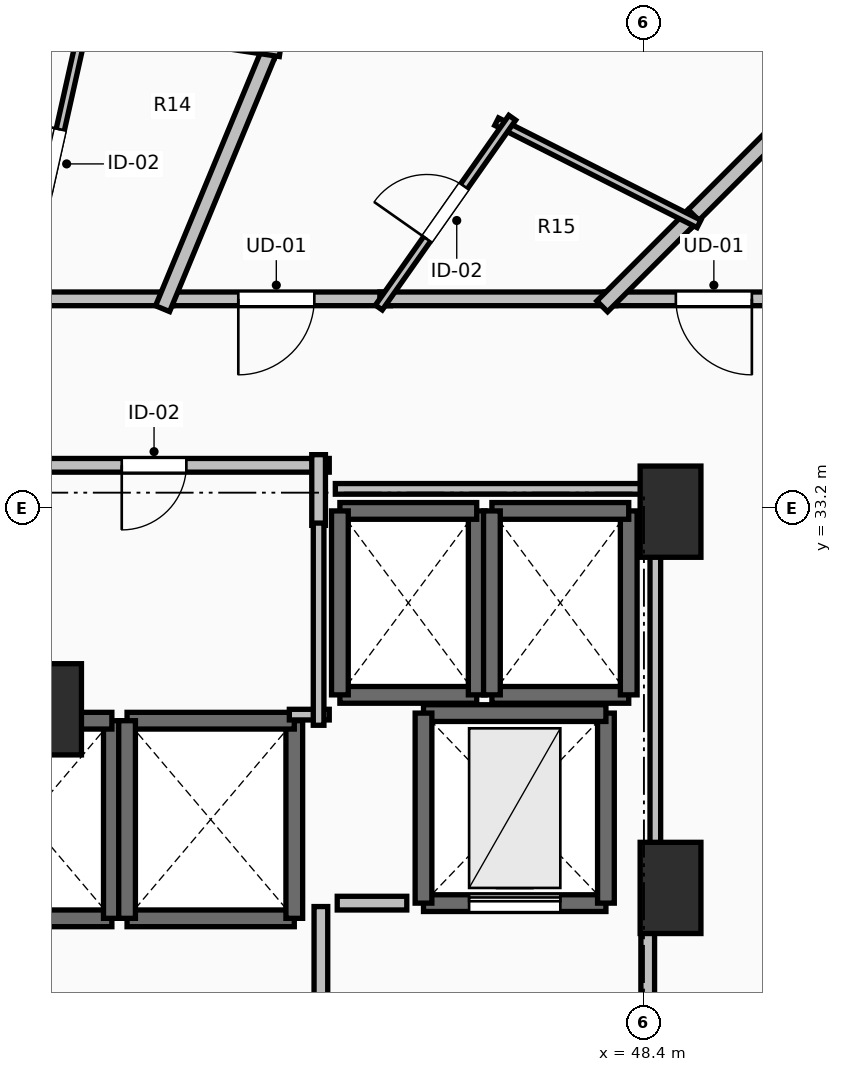
"""IFC4 building model, lengths in metres.
Left out: names, types, materials, properties, quantities, classifications, styles, units other than length and angle.
Written with IfcOpenShell. Run it as: python <this file> out.ifc"""

import sys

from ifc_helpers import new_model, si_unit, direction, frame, frame_2d, origin, origin_2d, place, context, subcontext, project, spatial, rectangle, extrude, element, fill, save


model = new_model("IFC4")
c1 = context("Model", 3, precision=1e-05, world=origin(), true_north=direction((0.0, 1.0)))
c2 = subcontext(c1, "Body", "Model", "MODEL_VIEW")
j1 = project(units=[si_unit("LENGTHUNIT", "METRE"), si_unit("PLANEANGLEUNIT", "RADIAN")], contexts=[c1])
p1 = place(None, origin())
s1 = spatial("IfcSite", under=j1, at=p1, CompositionType="ELEMENT")
p2 = place(p1, origin())
s2 = spatial("IfcBuilding", under=s1, at=p2, CompositionType="ELEMENT")
p3 = place(p2, frame((0.0, 0.0, 106.8)))
s3 = spatial("IfcBuildingStorey", under=s2, at=p3, CompositionType="ELEMENT", Elevation=106.8)
for number, where, z_axis, x_axis in (
    (1, (48.75, 33.15, 0.0), (0.0, 0.0, 1.0), (1.0, 0.0, 0.0)),
    (2, (48.75, 28.2, 0.0), (0.0, 0.0, 1.0), (1.0, 0.0, 0.0)),
    (3, (40.6, 30.55, 0.0), (0.0, 0.0, 1.0), (1.0, 0.0, 0.0)),
):
    element("IfcColumn", number, at=place(p3, frame(where, z_axis=z_axis, x_axis=x_axis)), inside=s3, PredefinedType="PILASTER", context=c2, shape_type="SweptSolid", body=[
        extrude(rectangle(XDim=0.8, YDim=1.2, at=origin_2d()), origin(), (0.0, 0.0, 1.0), 3.5),
    ])
p4 = place(p3, frame((39.2, 27.8, 0.0), z_axis=(0.0, 0.0, 1.0), x_axis=(1.0, 0.0, 0.0)))
e4 = element("IfcWall", 4, at=p4, inside=s3, PredefinedType="SOLIDWALL", context=c2, shape_type="SweptSolid", body=[
    extrude(rectangle(XDim=2.2, YDim=0.22, at=frame_2d((1.1, 0.0))), origin(), (0.0, 0.0, 1.0), 3.24),
])
p5 = place(p3, frame((41.4, 27.8, 0.0), z_axis=(0.0, 0.0, 1.0), x_axis=(0.0, 1.0, 0.0)))
e5 = element("IfcWall", 5, at=p5, inside=s3, PredefinedType="SOLIDWALL", context=c2, shape_type="SweptSolid", body=[
    extrude(rectangle(XDim=2.6, YDim=0.22, at=frame_2d((1.3, 0.0))), origin(), (0.0, 0.0, 1.0), 3.24),
])
for number, where, z_axis, x_axis in (
    (6, (41.4, 30.4, 0.0), (0.0, 0.0, 1.0), (-1.0, 0.0, 0.0)),
    (7, (41.6, 27.8, 0.0), (0.0, 0.0, 1.0), (1.0, 0.0, 0.0)),
):
    element("IfcWall", number, at=place(p3, frame(where, z_axis=z_axis, x_axis=x_axis)), inside=s3, PredefinedType="SOLIDWALL", context=c2, shape_type="SweptSolid", body=[
        extrude(rectangle(XDim=2.2, YDim=0.22, at=frame_2d((1.1, 0.0))), origin(), (0.0, 0.0, 1.0), 3.24),
    ])
p6 = place(p3, frame((43.8, 27.8, 0.0), z_axis=(0.0, 0.0, 1.0), x_axis=(0.0, 1.0, 0.0)))
e8 = element("IfcWall", 8, at=p6, inside=s3, PredefinedType="SOLIDWALL", context=c2, shape_type="SweptSolid", body=[
    extrude(rectangle(XDim=2.6, YDim=0.22, at=frame_2d((1.3, 0.0))), origin(), (0.0, 0.0, 1.0), 3.24),
])
p7 = place(p3, frame((43.8, 30.4, 0.0), z_axis=(0.0, 0.0, 1.0), x_axis=(-1.0, 0.0, 0.0)))
e9 = element("IfcWall", 9, at=p7, inside=s3, PredefinedType="SOLIDWALL", context=c2, shape_type="SweptSolid", body=[
    extrude(rectangle(XDim=2.2, YDim=0.22, at=frame_2d((1.1, 0.0))), origin(), (0.0, 0.0, 1.0), 3.24),
])
p8 = place(p3, frame((41.6, 30.4, 0.0), z_axis=(0.0, 0.0, 1.0), x_axis=(0.0, -1.0, 0.0)))
e10 = element("IfcWall", 10, at=p8, inside=s3, PredefinedType="SOLIDWALL", context=c2, shape_type="SweptSolid", body=[
    extrude(rectangle(XDim=2.6, YDim=0.22, at=frame_2d((1.3, 0.0))), origin(), (0.0, 0.0, 1.0), 3.24),
])
p9 = place(p3, frame((44.4, 30.74, 0.0), z_axis=(0.0, 0.0, 1.0), x_axis=(1.0, 0.0, 0.0)))
e11 = element("IfcWall", 11, at=p9, inside=s3, PredefinedType="SOLIDWALL", context=c2, shape_type="SweptSolid", body=[
    extrude(rectangle(XDim=1.8, YDim=0.22, at=frame_2d((0.9, 0.0))), origin(), (0.0, 0.0, 1.0), 3.24),
])
p10 = place(p3, frame((46.2, 30.74, 0.0), z_axis=(0.0, 0.0, 1.0), x_axis=(0.0, 1.0, 0.0)))
e12 = element("IfcWall", 12, at=p10, inside=s3, PredefinedType="SOLIDWALL", context=c2, shape_type="SweptSolid", body=[
    extrude(rectangle(XDim=2.42, YDim=0.22, at=frame_2d((1.21, 0.0))), origin(), (0.0, 0.0, 1.0), 3.24),
])
p11 = place(p3, frame((46.2, 33.16, 0.0), z_axis=(0.0, 0.0, 1.0), x_axis=(-1.0, 0.0, 0.0)))
e13 = element("IfcWall", 13, at=p11, inside=s3, PredefinedType="SOLIDWALL", context=c2, shape_type="SweptSolid", body=[
    extrude(rectangle(XDim=1.8, YDim=0.22, at=frame_2d((0.9, 0.0))), origin(), (0.0, 0.0, 1.0), 3.24),
])
p12 = place(p3, frame((44.4, 33.16, 0.0), z_axis=(0.0, 0.0, 1.0), x_axis=(0.0, -1.0, 0.0)))
e14 = element("IfcWall", 14, at=p12, inside=s3, PredefinedType="SOLIDWALL", context=c2, shape_type="SweptSolid", body=[
    extrude(rectangle(XDim=2.42, YDim=0.22, at=frame_2d((1.21, 0.0))), origin(), (0.0, 0.0, 1.0), 3.24),
])
p13 = place(p3, frame((46.4, 30.74, 0.0), z_axis=(0.0, 0.0, 1.0), x_axis=(1.0, 0.0, 0.0)))
e15 = element("IfcWall", 15, at=p13, inside=s3, PredefinedType="SOLIDWALL", context=c2, shape_type="SweptSolid", body=[
    extrude(rectangle(XDim=1.8, YDim=0.22, at=frame_2d((0.9, 0.0))), origin(), (0.0, 0.0, 1.0), 3.24),
])
p14 = place(p3, frame((48.2, 30.74, 0.0), z_axis=(0.0, 0.0, 1.0), x_axis=(0.0, 1.0, 0.0)))
e16 = element("IfcWall", 16, at=p14, inside=s3, PredefinedType="SOLIDWALL", context=c2, shape_type="SweptSolid", body=[
    extrude(rectangle(XDim=2.42, YDim=0.22, at=frame_2d((1.21, 0.0))), origin(), (0.0, 0.0, 1.0), 3.24),
])
p15 = place(p3, frame((48.2, 33.16, 0.0), z_axis=(0.0, 0.0, 1.0), x_axis=(-1.0, 0.0, 0.0)))
e17 = element("IfcWall", 17, at=p15, inside=s3, PredefinedType="SOLIDWALL", context=c2, shape_type="SweptSolid", body=[
    extrude(rectangle(XDim=1.8, YDim=0.22, at=frame_2d((0.9, 0.0))), origin(), (0.0, 0.0, 1.0), 3.24),
])
p16 = place(p3, frame((46.4, 33.16, 0.0), z_axis=(0.0, 0.0, 1.0), x_axis=(0.0, -1.0, 0.0)))
e18 = element("IfcWall", 18, at=p16, inside=s3, PredefinedType="SOLIDWALL", context=c2, shape_type="SweptSolid", body=[
    extrude(rectangle(XDim=2.42, YDim=0.22, at=frame_2d((1.21, 0.0))), origin(), (0.0, 0.0, 1.0), 3.24),
])
p17 = place(p3, frame((45.5, 28.0, 0.0), z_axis=(0.0, 0.0, 1.0), x_axis=(1.0, 0.0, 0.0)))
e19 = element("IfcWall", 19, at=p17, inside=s3, PredefinedType="SHEAR", context=c2, shape_type="SweptSolid", body=[
    extrude(rectangle(XDim=2.4, YDim=0.22, at=frame_2d((1.2, 0.0))), origin(), (0.0, 0.0, 1.0), 3.24),
])
p18 = place(p17, frame((0.6, 0.0, 0.0)))
e20 = element("IfcOpeningElement", 20, at=p18, cuts=e19, PredefinedType="OPENING", context=c2, shape_type="SweptSolid", body=[
    extrude(rectangle(XDim=1.2, YDim=2.2, at=frame_2d((0.6, 1.1))), frame((0.0, 0.125, 0.0), z_axis=(0.0, -1.0, 0.0), x_axis=(1.0, 0.0, 0.0)), (0.0, 0.0, 1.0), 0.25),
])
p19 = place(p3, frame((47.9, 28.0, 0.0), z_axis=(0.0, 0.0, 1.0), x_axis=(0.0, 1.0, 0.0)))
e21 = element("IfcWall", 21, at=p19, inside=s3, PredefinedType="SHEAR", context=c2, shape_type="SweptSolid", body=[
    extrude(rectangle(XDim=2.5, YDim=0.22, at=frame_2d((1.25, 0.0))), origin(), (0.0, 0.0, 1.0), 3.24),
])
p20 = place(p3, frame((47.9, 30.5, 0.0), z_axis=(0.0, 0.0, 1.0), x_axis=(-1.0, 0.0, 0.0)))
e22 = element("IfcWall", 22, at=p20, inside=s3, PredefinedType="SHEAR", context=c2, shape_type="SweptSolid", body=[
    extrude(rectangle(XDim=2.4, YDim=0.22, at=frame_2d((1.2, 0.0))), origin(), (0.0, 0.0, 1.0), 3.24),
])
p21 = place(p3, frame((45.5, 30.5, 0.0), z_axis=(0.0, 0.0, 1.0), x_axis=(0.0, -1.0, 0.0)))
e23 = element("IfcWall", 23, at=p21, inside=s3, PredefinedType="SHEAR", context=c2, shape_type="SweptSolid", body=[
    extrude(rectangle(XDim=2.5, YDim=0.22, at=frame_2d((1.25, 0.0))), origin(), (0.0, 0.0, 1.0), 3.24),
])
p22 = place(p3, frame((44.15, 27.955, 0.0), z_axis=(0.0, 0.0, 1.0), x_axis=(0.0, -1.0, 0.0)))
e24 = element("IfcWall", 24, at=p22, inside=s3, PredefinedType="PARTITIONING", context=c2, shape_type="SweptSolid", body=[
    extrude(rectangle(XDim=3.91, YDim=0.18, at=frame_2d((1.955, 0.0))), origin(), (0.0, 0.0, 1.0), 3.24),
])
p23 = place(p22, frame((1.355, 0.0, 0.0)))
e25 = element("IfcOpeningElement", 25, at=p23, cuts=e24, PredefinedType="OPENING", context=c2, shape_type="SweptSolid", body=[
    extrude(rectangle(XDim=1.2, YDim=2.15, at=frame_2d((0.6, 1.075))), frame((0.0, 0.105, 0.0), z_axis=(0.0, -1.0, 0.0), x_axis=(1.0, 0.0, 0.0)), (0.0, 0.0, 1.0), 0.21),
])
p24 = place(p3, frame((48.45, 23.95, 0.0), z_axis=(0.0, 0.0, 1.0), x_axis=(0.0, 1.0, 0.0)))
e26 = element("IfcWall", 26, at=p24, inside=s3, PredefinedType="PARTITIONING", context=c2, shape_type="SweptSolid", body=[
    extrude(rectangle(XDim=4.05, YDim=0.18, at=frame_2d((2.025, 0.0))), origin(), (0.0, 0.0, 1.0), 3.24),
])
p25 = place(p24, frame((1.425, 0.0, 0.0)))
e27 = element("IfcOpeningElement", 27, at=p25, cuts=e26, PredefinedType="OPENING", context=c2, shape_type="SweptSolid", body=[
    extrude(rectangle(XDim=1.2, YDim=2.15, at=frame_2d((0.6, 1.075))), frame((0.0, 0.105, 0.0), z_axis=(0.0, -1.0, 0.0), x_axis=(1.0, 0.0, 0.0)), (0.0, 0.0, 1.0), 0.21),
])
p26 = place(p3, frame((44.26, 33.76, 0.0), z_axis=(0.0, 0.0, 1.0), x_axis=(-1.0, 0.0, 0.0)))
e28 = element("IfcWall", 28, at=p26, inside=s3, PredefinedType="PARTITIONING", context=c2, shape_type="SweptSolid", body=[
    extrude(rectangle(XDim=4.61, YDim=0.18, at=frame_2d((2.305, 0.0))), origin(), (0.0, 0.0, 1.0), 3.24),
])
p27 = place(p26, frame((1.88, 0.0, 0.0)))
e29 = element("IfcOpeningElement", 29, at=p27, cuts=e28, PredefinedType="OPENING", context=c2, shape_type="SweptSolid", body=[
    extrude(rectangle(XDim=0.85, YDim=2.1, at=frame_2d((0.425, 1.05))), frame((0.0, 0.105, 0.0), z_axis=(0.0, -1.0, 0.0), x_axis=(1.0, 0.0, 0.0)), (0.0, 0.0, 1.0), 0.21),
])
p28 = place(p3, frame((44.12, 32.97, 0.0), z_axis=(0.0, 0.0, 1.0), x_axis=(0.0, 1.0, 0.0)))
e30 = element("IfcWall", 30, at=p28, inside=s3, PredefinedType="PARTITIONING", context=c2, shape_type="SweptSolid", body=[
    extrude(rectangle(XDim=0.93, YDim=0.18, at=frame_2d((0.465, 0.0))), origin(), (0.0, 0.0, 1.0), 3.24),
])
p29 = place(p3, frame((50.75, 35.95, 0.0), z_axis=(0.0, 0.0, 1.0), x_axis=(-1.0, 0.0, 0.0)))
e31 = element("IfcWall", 31, at=p29, inside=s3, PredefinedType="PARTITIONING", context=c2, shape_type="SweptSolid", body=[
    extrude(rectangle(XDim=2.86, YDim=0.18, at=frame_2d((1.43, 0.0))), origin(), (0.0, 0.0, 1.0), 2.432),
])
p30 = place(p29, frame((0.93, 0.0, 0.0)))
e32 = element("IfcOpeningElement", 32, at=p30, cuts=e31, PredefinedType="OPENING", context=c2, shape_type="SweptSolid", body=[
    extrude(rectangle(XDim=1.0, YDim=2.15, at=frame_2d((0.5, 1.075))), frame((0.0, 0.105, 0.0), z_axis=(0.0, -1.0, 0.0), x_axis=(1.0, 0.0, 0.0)), (0.0, 0.0, 1.0), 0.21),
])
p31 = place(p3, frame((45.066, 35.95, 0.0), z_axis=(0.0, 0.0, 1.0), x_axis=(-1.0, 0.0, 0.0)))
e33 = element("IfcWall", 33, at=p31, inside=s3, PredefinedType="PARTITIONING", context=c2, shape_type="SweptSolid", body=[
    extrude(rectangle(XDim=3.005, YDim=0.18, at=frame_2d((1.502, 0.0))), origin(), (0.0, 0.0, 1.0), 3.24),
])
p32 = place(p31, frame((1.002, 0.0, 0.0)))
e34 = element("IfcOpeningElement", 34, at=p32, cuts=e33, PredefinedType="OPENING", context=c2, shape_type="SweptSolid", body=[
    extrude(rectangle(XDim=1.0, YDim=2.15, at=frame_2d((0.5, 1.075))), frame((0.0, 0.105, 0.0), z_axis=(0.0, -1.0, 0.0), x_axis=(1.0, 0.0, 0.0)), (0.0, 0.0, 1.0), 0.21),
])
p33 = place(p3, frame((48.03, 35.95, 0.0), z_axis=(0.0, 0.0, 1.0), x_axis=(-1.0, 0.0, 0.0)))
e35 = element("IfcWall", 35, at=p33, inside=s3, PredefinedType="PARTITIONING", context=c2, shape_type="SweptSolid", body=[
    extrude(rectangle(XDim=3.104, YDim=0.18, at=frame_2d((1.552, 0.0))), origin(), (0.0, 0.0, 1.0), 2.432),
])
p34 = place(p3, frame((42.201, 35.95, 0.0), z_axis=(0.0, 0.0, 1.0), x_axis=(-1.0, 0.0, 0.0)))
e36 = element("IfcWall", 36, at=p34, inside=s3, PredefinedType="PARTITIONING", context=c2, shape_type="SweptSolid", body=[
    extrude(rectangle(XDim=2.056, YDim=0.18, at=frame_2d((1.028, 0.0))), origin(), (0.0, 0.0, 1.0), 3.24),
])
p35 = place(p3, frame((53.768, 41.768, 0.0), z_axis=(0.0, 0.0, 1.0), x_axis=(-0.707106781187, -0.707106781187, 0.0)))
e37 = element("IfcWall", 37, at=p35, inside=s3, PredefinedType="PARTITIONING", context=c2, shape_type="SweptSolid", body=[
    extrude(rectangle(XDim=6.808, YDim=0.2, at=frame_2d((3.404, 0.0))), origin(), (0.0, 0.0, 1.0), 2.677),
])
p36 = place(p3, frame((49.053, 37.053, 0.0), z_axis=(0.0, 0.0, 1.0), x_axis=(-0.707106781187, -0.707106781187, 0.0)))
e38 = element("IfcWall", 38, at=p36, inside=s3, PredefinedType="PARTITIONING", context=c2, shape_type="SweptSolid", body=[
    extrude(rectangle(XDim=1.7, YDim=0.2, at=frame_2d((0.85, 0.0))), origin(), (0.0, 0.0, 1.0), 2.432),
])
p37 = place(p3, frame((46.462, 38.281, 0.0), z_axis=(0.0, 0.0, 1.0), x_axis=(0.892486842203, -0.451073426944, 0.0)))
e39 = element("IfcWall", 39, at=p37, inside=s3, PredefinedType="PARTITIONING", context=c2, shape_type="SweptSolid", body=[
    extrude(rectangle(XDim=2.982, YDim=0.11, at=frame_2d((1.491, 0.0))), origin(), (0.0, 0.0, 1.0), 2.432),
])
p38 = place(p3, frame((44.913, 35.835, 0.0), z_axis=(0.0, 0.0, 1.0), x_axis=(0.574986040322, 0.818163219312, 0.0)))
e40 = element("IfcWall", 40, at=p38, inside=s3, PredefinedType="PARTITIONING", context=c2, shape_type="SweptSolid", body=[
    extrude(rectangle(XDim=3.052, YDim=0.11, at=frame_2d((1.526, 0.0))), origin(), (0.0, 0.0, 1.0), 2.886),
])
p39 = place(p38, frame((1.101, 0.0, 0.0)))
e41 = element("IfcOpeningElement", 41, at=p39, cuts=e40, PredefinedType="OPENING", context=c2, shape_type="SweptSolid", body=[
    extrude(rectangle(XDim=0.85, YDim=2.1, at=frame_2d((0.425, 1.05))), frame((0.0, 0.07, 0.0), z_axis=(0.0, -1.0, 0.0), x_axis=(1.0, 0.0, 0.0)), (0.0, 0.0, 1.0), 0.14),
])
p40 = place(p3, frame((45.808, 44.851, 0.0), z_axis=(0.0, 0.0, 1.0), x_axis=(-0.382705075352, -0.923870567395, 0.0)))
e42 = element("IfcWall", 42, at=p40, inside=s3, PredefinedType="PARTITIONING", context=c2, shape_type="SweptSolid", body=[
    extrude(rectangle(XDim=6.164, YDim=0.2, at=frame_2d((3.082, 0.0))), origin(), (0.0, 0.0, 1.0), 2.677),
])
p41 = place(p3, frame((43.503, 39.285, 0.0), z_axis=(0.0, 0.0, 1.0), x_axis=(-0.382733183699, -0.923858923265, 0.0)))
e43 = element("IfcWall", 43, at=p41, inside=s3, PredefinedType="PARTITIONING", context=c2, shape_type="SweptSolid", body=[
    extrude(rectangle(XDim=3.75, YDim=0.2, at=frame_2d((1.875, 0.0))), origin(), (0.0, 0.0, 1.0), 2.886),
])
p42 = place(p3, frame((40.194, 35.813, 0.0), z_axis=(0.0, 0.0, 1.0), x_axis=(0.21804880916, 0.975937865248, 0.0)))
e44 = element("IfcWall", 44, at=p42, inside=s3, PredefinedType="PARTITIONING", context=c2, shape_type="SweptSolid", body=[
    extrude(rectangle(XDim=3.998, YDim=0.11, at=frame_2d((1.999, 0.0))), origin(), (0.0, 0.0, 1.0), 2.886),
])
p43 = place(p42, frame((1.574, 0.0, 0.0)))
e45 = element("IfcOpeningElement", 45, at=p43, cuts=e44, PredefinedType="OPENING", context=c2, shape_type="SweptSolid", body=[
    extrude(rectangle(XDim=0.85, YDim=2.1, at=frame_2d((0.425, 1.05))), frame((0.0, 0.07, 0.0), z_axis=(0.0, -1.0, 0.0), x_axis=(1.0, 0.0, 0.0)), (0.0, 0.0, 1.0), 0.14),
])
p44 = place(p3, frame((40.896, 39.6, 0.0), z_axis=(0.0, 0.0, 1.0), x_axis=(0.98891024541, -0.148514398367, 0.0)))
e46 = element("IfcWall", 46, at=p44, inside=s3, PredefinedType="PARTITIONING", context=c2, shape_type="SweptSolid", body=[
    extrude(rectangle(XDim=2.745, YDim=0.11, at=frame_2d((1.373, 0.0))), origin(), (0.0, 0.0, 1.0), 2.972),
])
p45 = place(p3, frame((45.28, 28.0, 0.0), z_axis=(0.0, 0.0, 1.0), x_axis=(-1.0, 0.0, 0.0)))
e47 = element("IfcWall", 47, at=p45, inside=s3, PredefinedType="PARTITIONING", context=c2, shape_type="SweptSolid", body=[
    extrude(rectangle(XDim=0.915, YDim=0.18, at=frame_2d((0.458, 0.0))), origin(), (0.0, 0.0, 1.0), 3.24),
])
p46 = place(p3, frame((43.735, 30.48, 0.0), z_axis=(0.0, 0.0, 1.0), x_axis=(1.0, 0.0, 0.0)))
e48 = element("IfcWall", 48, at=p46, inside=s3, PredefinedType="PARTITIONING", context=c2, shape_type="SweptSolid", body=[
    extrude(rectangle(XDim=0.525, YDim=0.14, at=frame_2d((0.262, 0.0))), origin(), (0.0, 0.0, 1.0), 3.24),
])
p47 = place(p3, frame((44.12, 30.34, 0.0), z_axis=(0.0, 0.0, 1.0), x_axis=(0.0, 1.0, 0.0)))
e49 = element("IfcWall", 49, at=p47, inside=s3, PredefinedType="PARTITIONING", context=c2, shape_type="SweptSolid", body=[
    extrude(rectangle(XDim=2.66, YDim=0.14, at=frame_2d((1.33, 0.0))), origin(), (0.0, 0.0, 1.0), 3.24),
])
p48 = place(p3, frame((44.34, 33.45, 0.0), z_axis=(0.0, 0.0, 1.0), x_axis=(1.0, 0.0, 0.0)))
e50 = element("IfcWall", 50, at=p48, inside=s3, PredefinedType="PARTITIONING", context=c2, shape_type="SweptSolid", body=[
    extrude(rectangle(XDim=4.21, YDim=0.14, at=frame_2d((2.105, 0.0))), origin(), (0.0, 0.0, 1.0), 2.432),
])
p49 = place(p3, frame((48.55, 33.45, 0.0), z_axis=(0.0, 0.0, 1.0), x_axis=(0.0, -1.0, 0.0)))
e51 = element("IfcWall", 51, at=p49, inside=s3, PredefinedType="PARTITIONING", context=c2, shape_type="SweptSolid", body=[
    extrude(rectangle(XDim=5.254, YDim=0.14, at=frame_2d((2.627, 0.0))), origin(), (0.0, 0.0, 1.0), 2.432),
])
p50 = place(p18, origin())
e52 = element("IfcDoor", 52, at=p50, inside=s3, OperationType="SLIDING_TO_LEFT", PredefinedType="DOOR", context=c2, shape_type="SweptSolid", body=[
    extrude(rectangle(XDim=1.2, YDim=2.2, at=frame_2d((0.6, 1.1))), frame((0.0, 0.025, 0.0), z_axis=(0.0, -1.0, 0.0), x_axis=(1.0, 0.0, 0.0)), (0.0, 0.0, 1.0), 0.05),
])
fill(e20, e52)
p51 = place(p27, origin())
e53 = element("IfcDoor", 53, at=p51, inside=s3, OperationType="SINGLE_SWING_RIGHT", PredefinedType="DOOR", context=c2, shape_type="SweptSolid", body=[
    extrude(rectangle(XDim=0.85, YDim=2.1, at=frame_2d((0.425, 1.05))), frame((0.0, 0.025, 0.0), z_axis=(0.0, -1.0, 0.0), x_axis=(1.0, 0.0, 0.0)), (0.0, 0.0, 1.0), 0.05),
])
fill(e29, e53)
p52 = place(p30, origin())
e54 = element("IfcDoor", 54, at=p52, inside=s3, OperationType="SINGLE_SWING_LEFT", PredefinedType="DOOR", context=c2, shape_type="SweptSolid", body=[
    extrude(rectangle(XDim=1.0, YDim=2.15, at=frame_2d((0.5, 1.075))), frame((0.0, 0.025, 0.0), z_axis=(0.0, -1.0, 0.0), x_axis=(1.0, 0.0, 0.0)), (0.0, 0.0, 1.0), 0.05),
])
fill(e32, e54)
p53 = place(p32, origin())
e55 = element("IfcDoor", 55, at=p53, inside=s3, OperationType="SINGLE_SWING_RIGHT", PredefinedType="DOOR", context=c2, shape_type="SweptSolid", body=[
    extrude(rectangle(XDim=1.0, YDim=2.15, at=frame_2d((0.5, 1.075))), frame((0.0, 0.025, 0.0), z_axis=(0.0, -1.0, 0.0), x_axis=(1.0, 0.0, 0.0)), (0.0, 0.0, 1.0), 0.05),
])
fill(e34, e55)
p54 = place(p39, origin())
e56 = element("IfcDoor", 56, at=p54, inside=s3, OperationType="SINGLE_SWING_LEFT", PredefinedType="DOOR", context=c2, shape_type="SweptSolid", body=[
    extrude(rectangle(XDim=0.85, YDim=2.1, at=frame_2d((0.425, 1.05))), frame((0.0, 0.025, 0.0), z_axis=(0.0, -1.0, 0.0), x_axis=(1.0, 0.0, 0.0)), (0.0, 0.0, 1.0), 0.05),
])
fill(e41, e56)
p55 = place(p43, origin())
e57 = element("IfcDoor", 57, at=p55, inside=s3, OperationType="SINGLE_SWING_RIGHT", PredefinedType="DOOR", context=c2, shape_type="SweptSolid", body=[
    extrude(rectangle(XDim=0.85, YDim=2.1, at=frame_2d((0.425, 1.05))), frame((0.0, 0.025, 0.0), z_axis=(0.0, -1.0, 0.0), x_axis=(1.0, 0.0, 0.0)), (0.0, 0.0, 1.0), 0.05),
])
fill(e45, e57)
save(model, sys.argv[1])
